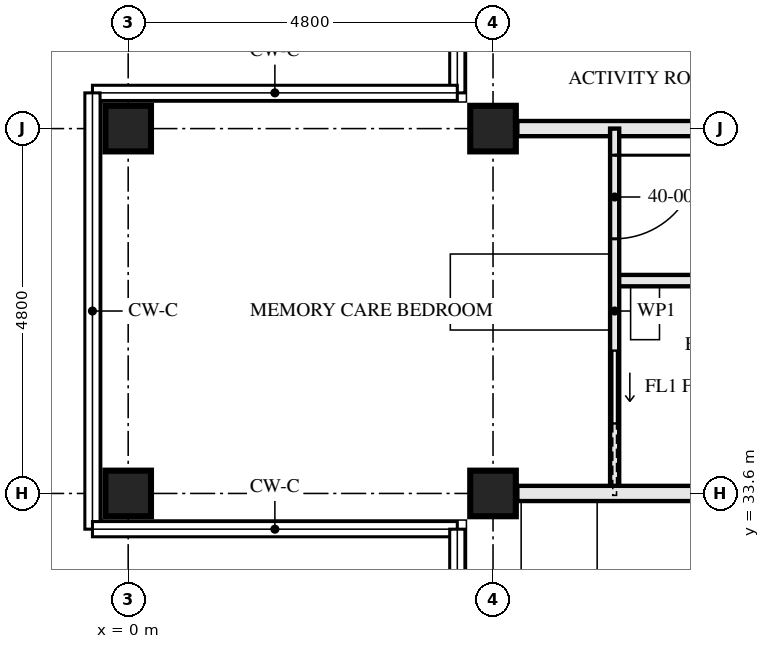
"""IFC4 building model, lengths in metres.
Left out: names, types, materials, properties, quantities, classifications, styles, units other than length and angle.
Written with IfcOpenShell. Run it as: python <this file> out.ifc"""

import sys

from ifc_helpers import new_model, si_unit, direction, frame, frame_2d, origin, origin_2d, place, context, subcontext, project, spatial, rectangle, hollow_rectangle, extrude, element, fill, save


model = new_model("IFC4")
c1 = context("Model", 3, precision=1e-05, world=origin(), true_north=direction((0.0, 1.0)))
c2 = subcontext(c1, "Body", "Model", "MODEL_VIEW")
j1 = project(units=[si_unit("LENGTHUNIT", "METRE"), si_unit("PLANEANGLEUNIT", "RADIAN")], contexts=[c1])
p1 = place(None, origin())
s1 = spatial("IfcSite", under=j1, at=p1, CompositionType="ELEMENT")
p2 = place(p1, origin())
s2 = spatial("IfcBuilding", under=s1, at=p2, CompositionType="ELEMENT")
p3 = place(p2, frame((0.0, 0.0, 148.0)))
s3 = spatial("IfcBuildingStorey", under=s2, at=p3, CompositionType="ELEMENT", Elevation=148.0)
for number, where, z_axis, x_axis in (
    (1, (0.0, 33.6, 0.0), (0.0, 0.0, 1.0), (0.0, 1.0, 0.0)),
    (2, (0.0, 38.4, 0.0), (0.0, 0.0, 1.0), (0.0, 1.0, 0.0)),
    (3, (4.8, 33.6, 0.0), (0.0, 0.0, 1.0), (0.0, 1.0, 0.0)),
    (4, (4.8, 38.4, 0.0), (0.0, 0.0, 1.0), (0.0, 1.0, 0.0)),
):
    element("IfcColumn", number, at=place(p3, frame(where, z_axis=z_axis, x_axis=x_axis)), inside=s3, PredefinedType="COLUMN", context=c2, shape_type="SweptSolid", body=[
        extrude(hollow_rectangle(XDim=0.6, YDim=0.6, WallThickness=0.08, at=origin_2d()), origin(), (0.0, 0.0, 1.0), 3.5),
    ])
p4 = place(p3, frame((5.12, 38.4, 0.0), z_axis=(0.0, 0.0, 1.0), x_axis=(1.0, 0.0, 0.0)))
e5 = element("IfcWall", 5, at=p4, inside=s3, PredefinedType="PARTITIONING", context=c2, shape_type="SweptSolid", body=[
    extrude(rectangle(XDim=7.28, YDim=0.2, at=frame_2d((3.64, 0.0))), origin(), (0.0, 0.0, 1.0), 2.55),
])
p5 = place(p3, frame((6.4, 36.4, 0.0), z_axis=(0.0, 0.0, 1.0), x_axis=(1.0, 0.0, 0.0)))
e6 = element("IfcWall", 6, at=p5, inside=s3, PredefinedType="PARTITIONING", context=c2, shape_type="SweptSolid", body=[
    extrude(rectangle(XDim=3.0, YDim=0.15, at=frame_2d((1.5, 0.0))), origin(), (0.0, 0.0, 1.0), 3.33),
])
p6 = place(p3, frame((6.4, 38.4, 0.0), z_axis=(0.0, 0.0, 1.0), x_axis=(0.0, -1.0, 0.0)))
e7 = element("IfcWall", 7, at=p6, inside=s3, PredefinedType="PARTITIONING", context=c2, shape_type="SweptSolid", body=[
    extrude(rectangle(XDim=4.8, YDim=0.12, at=frame_2d((2.4, 0.0))), origin(), (0.0, 0.0, 1.0), 3.33),
])
p7 = place(p6, frame((0.35, 0.0, 0.0)))
e8 = element("IfcOpeningElement", 8, at=p7, cuts=e7, PredefinedType="OPENING", context=c2, shape_type="SweptSolid", body=[
    extrude(rectangle(XDim=1.1, YDim=2.1, at=frame_2d((0.55, 1.05))), frame((0.0, 0.071, 0.0), z_axis=(0.0, -1.0, 0.0), x_axis=(1.0, 0.0, 0.0)), (0.0, 0.0, 1.0), 0.141),
])
p8 = place(p6, frame((2.925, 0.0, 0.0)))
e9 = element("IfcOpeningElement", 9, at=p8, cuts=e7, PredefinedType="OPENING", context=c2, shape_type="SweptSolid", body=[
    extrude(rectangle(XDim=0.95, YDim=2.1, at=frame_2d((0.475, 1.05))), frame((0.0, 0.071, 0.0), z_axis=(0.0, -1.0, 0.0), x_axis=(1.0, 0.0, 0.0)), (0.0, 0.0, 1.0), 0.141),
])
p9 = place(p3, frame((5.12, 33.6, 0.0), z_axis=(0.0, 0.0, 1.0), x_axis=(1.0, 0.0, 0.0)))
e10 = element("IfcWall", 10, at=p9, inside=s3, PredefinedType="PARTITIONING", context=c2, shape_type="SweptSolid", body=[
    extrude(rectangle(XDim=7.28, YDim=0.2, at=frame_2d((3.64, 0.0))), origin(), (0.0, 0.0, 1.0), 2.55),
])
p10 = place(p7, origin())
e11 = element("IfcDoor", 11, at=p10, inside=s3, OperationType="SINGLE_SWING_RIGHT", PredefinedType="DOOR", context=c2, shape_type="SweptSolid", body=[
    extrude(rectangle(XDim=1.1, YDim=2.1, at=frame_2d((0.55, 1.05))), frame((0.0, 0.022, 0.0), z_axis=(0.0, -1.0, 0.0), x_axis=(1.0, 0.0, 0.0)), (0.0, 0.0, 1.0), 0.044),
])
fill(e8, e11)
p11 = place(p8, origin())
e12 = element("IfcDoor", 12, at=p11, inside=s3, OperationType="SLIDING_TO_LEFT", PredefinedType="DOOR", context=c2, shape_type="SweptSolid", body=[
    extrude(rectangle(XDim=0.95, YDim=2.1, at=frame_2d((0.475, 1.05))), frame((0.0, 0.022, 0.0), z_axis=(0.0, -1.0, 0.0), x_axis=(1.0, 0.0, 0.0)), (0.0, 0.0, 1.0), 0.044),
])
fill(e9, e12)
save(model, sys.argv[1])
